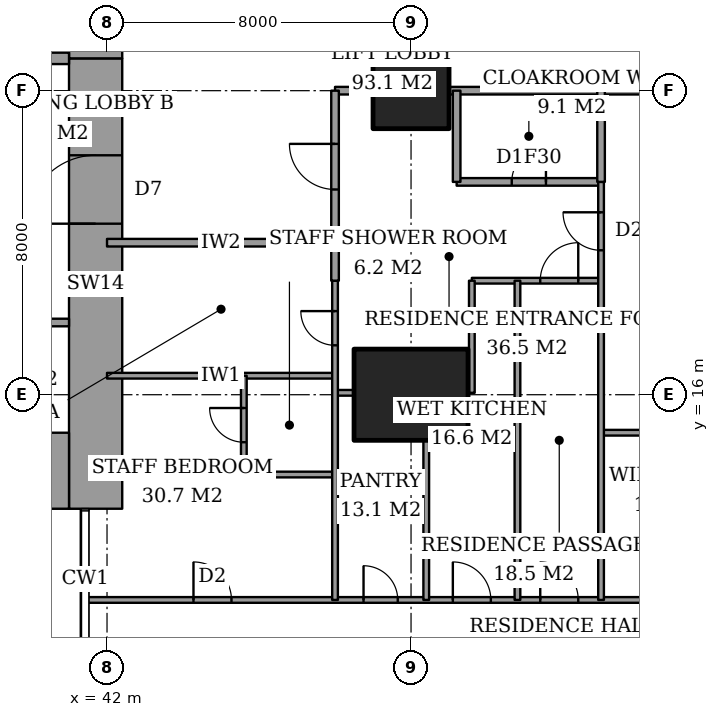
"""IFC4 building model, lengths in metres.
Left out: names, types, materials, properties, quantities, classifications, styles, units other than length and angle.
Written with IfcOpenShell. Run it as: python <this file> out.ifc"""

import sys

from ifc_helpers import new_model, si_unit, direction, frame, frame_2d, origin, origin_2d, place, context, subcontext, project, spatial, rectangle, extrude, element, fill, save


model = new_model("IFC4")
c1 = context("Model", 3, precision=1e-05, world=origin(), true_north=direction((0.0, 1.0)))
c2 = subcontext(c1, "Body", "Model", "MODEL_VIEW")
j1 = project(units=[si_unit("LENGTHUNIT", "METRE"), si_unit("PLANEANGLEUNIT", "RADIAN")], contexts=[c1])
p1 = place(None, origin())
s1 = spatial("IfcSite", under=j1, at=p1, CompositionType="ELEMENT")
p2 = place(p1, origin())
s2 = spatial("IfcBuilding", under=s1, at=p2, CompositionType="ELEMENT")
p3 = place(p2, frame((0.0, 0.0, 143.0)))
s3 = spatial("IfcBuildingStorey", under=s2, at=p3, CompositionType="ELEMENT", Elevation=143.0)
p4 = place(p3, frame((50.0, 16.0, 0.0), z_axis=(0.0, 0.0, 1.0), x_axis=(1.0, 0.0, 0.0)))
e1 = element("IfcColumn", 1, at=p4, inside=s3, PredefinedType="COLUMN", context=c2, shape_type="SweptSolid", body=[
    extrude(rectangle(XDim=3.0, YDim=2.4, at=origin_2d()), origin(), (0.0, 0.0, 1.0), 3.6),
])
p5 = place(p3, frame((50.0, 24.0, 0.0), z_axis=(0.0, 0.0, 1.0), x_axis=(1.0, 0.0, 0.0)))
e2 = element("IfcColumn", 2, at=p5, inside=s3, PredefinedType="COLUMN", context=c2, shape_type="SweptSolid", body=[
    extrude(rectangle(XDim=2.0, YDim=2.0, at=origin_2d()), origin(), (0.0, 0.0, 1.0), 3.6),
])
p6 = place(p3, frame((37.85, 14.0, 0.0), z_axis=(0.0, 0.0, 1.0), x_axis=(1.0, 0.0, 0.0)))
e3 = element("IfcWall", 3, at=p6, inside=s3, PredefinedType="SHEAR", context=c2, shape_type="SweptSolid", body=[
    extrude(rectangle(XDim=3.15, YDim=2.0, at=frame_2d((1.575, 0.0))), origin(), (0.0, 0.0, 1.0), 3.6),
])
p7 = place(p3, frame((41.7, 13.0, 0.0), z_axis=(0.0, 0.0, 1.0), x_axis=(0.0, 1.0, 0.0)))
e4 = element("IfcWall", 4, at=p7, inside=s3, PredefinedType="SHEAR", context=c2, shape_type="SweptSolid", body=[
    extrude(rectangle(XDim=11.85, YDim=1.4, at=frame_2d((5.925, 0.0))), origin(), (0.0, 0.0, 1.0), 3.6),
])
p8 = place(p7, frame((7.5, 0.0, 0.0)))
e5 = element("IfcOpeningElement", 5, at=p8, cuts=e4, PredefinedType="OPENING", context=c2, shape_type="SweptSolid", body=[
    extrude(rectangle(XDim=1.8, YDim=2.4, at=frame_2d((0.9, 1.2))), frame((0.0, 0.71, 0.0), z_axis=(0.0, -1.0, 0.0), x_axis=(1.0, 0.0, 0.0)), (0.0, 0.0, 1.0), 1.42),
])
p9 = place(p3, frame((41.7, 24.85, 0.0), z_axis=(0.0, 0.0, 1.0), x_axis=(0.0, 1.0, 0.0)))
e6 = element("IfcWall", 6, at=p9, inside=s3, PredefinedType="SHEAR", context=c2, shape_type="SweptSolid", body=[
    extrude(rectangle(XDim=10.15, YDim=1.4, at=frame_2d((5.075, 0.0))), origin(), (0.0, 0.0, 1.0), 3.6),
])
p10 = place(p3, frame((37.85, 24.85, 0.0), z_axis=(0.0, 0.0, 1.0), x_axis=(1.0, 0.0, 0.0)))
e7 = element("IfcWall", 7, at=p10, inside=s3, PredefinedType="SHEAR", context=c2, shape_type="SweptSolid", body=[
    extrude(rectangle(XDim=3.15, YDim=0.3, at=frame_2d((1.575, 0.0))), origin(), (0.0, 0.0, 1.0), 3.6),
])
p11 = place(p10, frame((0.95, 0.0, 0.0)))
e8 = element("IfcOpeningElement", 8, at=p11, cuts=e7, PredefinedType="OPENING", context=c2, shape_type="SweptSolid", body=[
    extrude(rectangle(XDim=1.0, YDim=2.1, at=frame_2d((0.5, 1.05))), frame((0.0, 0.16, 0.0), z_axis=(0.0, -1.0, 0.0), x_axis=(1.0, 0.0, 0.0)), (0.0, 0.0, 1.0), 0.32),
])
p12 = place(p3, frame((41.439, 10.6, 0.0), z_axis=(0.0, 0.0, 1.0), x_axis=(1.0, 0.0, 0.0)))
e9 = element("IfcWall", 9, at=p12, inside=s3, PredefinedType="PARTITIONING", context=c2, shape_type="SweptSolid", body=[
    extrude(rectangle(XDim=25.011, YDim=0.15, at=frame_2d((12.505, 0.0))), origin(), (0.0, 0.0, 1.0), 3.35),
])
p13 = place(p12, frame((11.961, 0.0, 0.0)))
e10 = element("IfcOpeningElement", 10, at=p13, cuts=e9, PredefinedType="OPENING", context=c2, shape_type="SweptSolid", body=[
    extrude(rectangle(XDim=1.0, YDim=2.1, at=frame_2d((0.5, 1.05))), frame((0.0, 0.085, 0.0), z_axis=(0.0, -1.0, 0.0), x_axis=(1.0, 0.0, 0.0)), (0.0, 0.0, 1.0), 0.17),
])
p14 = place(p12, frame((20.924, 0.0, 0.0)))
e11 = element("IfcOpeningElement", 11, at=p14, cuts=e9, PredefinedType="OPENING", context=c2, shape_type="SweptSolid", body=[
    extrude(rectangle(XDim=1.0, YDim=2.1, at=frame_2d((0.5, 1.05))), frame((0.0, 0.085, 0.0), z_axis=(0.0, -1.0, 0.0), x_axis=(1.0, 0.0, 0.0)), (0.0, 0.0, 1.0), 0.17),
])
p15 = place(p12, frame((15.249, 0.0, 0.0)))
e12 = element("IfcOpeningElement", 12, at=p15, cuts=e9, PredefinedType="OPENING", context=c2, shape_type="SweptSolid", body=[
    extrude(rectangle(XDim=0.9, YDim=2.1, at=frame_2d((0.45, 1.05))), frame((0.0, 0.085, 0.0), z_axis=(0.0, -1.0, 0.0), x_axis=(1.0, 0.0, 0.0)), (0.0, 0.0, 1.0), 0.17),
])
p16 = place(p12, frame((9.661, 0.0, 0.0)))
e13 = element("IfcOpeningElement", 13, at=p16, cuts=e9, PredefinedType="OPENING", context=c2, shape_type="SweptSolid", body=[
    extrude(rectangle(XDim=1.0, YDim=2.1, at=frame_2d((0.5, 1.05))), frame((0.0, 0.085, 0.0), z_axis=(0.0, -1.0, 0.0), x_axis=(1.0, 0.0, 0.0)), (0.0, 0.0, 1.0), 0.17),
])
p17 = place(p12, frame((7.311, 0.0, 0.0)))
e14 = element("IfcOpeningElement", 14, at=p17, cuts=e9, PredefinedType="OPENING", context=c2, shape_type="SweptSolid", body=[
    extrude(rectangle(XDim=0.9, YDim=2.1, at=frame_2d((0.45, 1.05))), frame((0.0, 0.085, 0.0), z_axis=(0.0, -1.0, 0.0), x_axis=(1.0, 0.0, 0.0)), (0.0, 0.0, 1.0), 0.17),
])
p18 = place(p12, frame((2.836, 0.0, 0.0)))
e15 = element("IfcOpeningElement", 15, at=p18, cuts=e9, PredefinedType="OPENING", context=c2, shape_type="SweptSolid", body=[
    extrude(rectangle(XDim=1.0, YDim=2.1, at=frame_2d((0.5, 1.05))), frame((0.0, 0.085, 0.0), z_axis=(0.0, -1.0, 0.0), x_axis=(1.0, 0.0, 0.0)), (0.0, 0.0, 1.0), 0.17),
])
p19 = place(p3, frame((45.6, 13.9, 0.0), z_axis=(0.0, 0.0, 1.0), x_axis=(1.0, 0.0, 0.0)))
e16 = element("IfcWall", 16, at=p19, inside=s3, PredefinedType="PARTITIONING", context=c2, shape_type="SweptSolid", body=[
    extrude(rectangle(XDim=2.4, YDim=0.15, at=frame_2d((1.2, 0.0))), origin(), (0.0, 0.0, 1.0), 3.35),
])
p20 = place(p3, frame((55.0, 15.0, 0.0), z_axis=(0.0, 0.0, 1.0), x_axis=(1.0, 0.0, 0.0)))
e17 = element("IfcWall", 17, at=p20, inside=s3, PredefinedType="PARTITIONING", context=c2, shape_type="SweptSolid", body=[
    extrude(rectangle(XDim=1.5, YDim=0.15, at=frame_2d((0.75, 0.0))), origin(), (0.0, 0.0, 1.0), 3.35),
])
p21 = place(p3, frame((48.0, 16.05, 0.0), z_axis=(0.0, 0.0, 1.0), x_axis=(1.0, 0.0, 0.0)))
e18 = element("IfcWall", 18, at=p21, inside=s3, PredefinedType="PARTITIONING", context=c2, shape_type="SweptSolid", body=[
    extrude(rectangle(XDim=0.5, YDim=0.15, at=frame_2d((0.25, 0.0))), origin(), (0.0, 0.0, 1.0), 2.634),
])
p22 = place(p3, frame((42.0, 16.5, 0.0), z_axis=(0.0, 0.0, 1.0), x_axis=(1.0, 0.0, 0.0)))
e19 = element("IfcWall", 19, at=p22, inside=s3, PredefinedType="PARTITIONING", context=c2, shape_type="SweptSolid", body=[
    extrude(rectangle(XDim=6.0, YDim=0.15, at=frame_2d((3.0, 0.0))), origin(), (0.0, 0.0, 1.0), 3.35),
])
p23 = place(p3, frame((51.6, 19.0, 0.0), z_axis=(0.0, 0.0, 1.0), x_axis=(1.0, 0.0, 0.0)))
e20 = element("IfcWall", 20, at=p23, inside=s3, PredefinedType="PARTITIONING", context=c2, shape_type="SweptSolid", body=[
    extrude(rectangle(XDim=3.4, YDim=0.15, at=frame_2d((1.7, 0.0))), origin(), (0.0, 0.0, 1.0), 3.35),
])
p24 = place(p23, frame((1.8, 0.0, 0.0)))
e21 = element("IfcOpeningElement", 21, at=p24, cuts=e20, PredefinedType="OPENING", context=c2, shape_type="SweptSolid", body=[
    extrude(rectangle(XDim=1.0, YDim=2.1, at=frame_2d((0.5, 1.05))), frame((0.0, 0.085, 0.0), z_axis=(0.0, -1.0, 0.0), x_axis=(1.0, 0.0, 0.0)), (0.0, 0.0, 1.0), 0.17),
])
p25 = place(p3, frame((42.0, 20.0, 0.0), z_axis=(0.0, 0.0, 1.0), x_axis=(1.0, 0.0, 0.0)))
e22 = element("IfcWall", 22, at=p25, inside=s3, PredefinedType="PARTITIONING", context=c2, shape_type="SweptSolid", body=[
    extrude(rectangle(XDim=6.0, YDim=0.2, at=frame_2d((3.0, 0.0))), origin(), (0.0, 0.0, 1.0), 3.35),
])
p26 = place(p3, frame((51.2, 21.6, 0.0), z_axis=(0.0, 0.0, 1.0), x_axis=(1.0, 0.0, 0.0)))
e23 = element("IfcWall", 23, at=p26, inside=s3, PredefinedType="PARTITIONING", context=c2, shape_type="SweptSolid", body=[
    extrude(rectangle(XDim=3.8, YDim=0.2, at=frame_2d((1.9, 0.0))), origin(), (0.0, 0.0, 1.0), 3.35),
])
p27 = place(p26, frame((1.45, 0.0, 0.0)))
e24 = element("IfcOpeningElement", 24, at=p27, cuts=e23, PredefinedType="OPENING", context=c2, shape_type="SweptSolid", body=[
    extrude(rectangle(XDim=0.9, YDim=2.1, at=frame_2d((0.45, 1.05))), frame((0.0, 0.11, 0.0), z_axis=(0.0, -1.0, 0.0), x_axis=(1.0, 0.0, 0.0)), (0.0, 0.0, 1.0), 0.22),
])
p28 = place(p3, frame((48.0, 24.0, 0.0), z_axis=(0.0, 0.0, 1.0), x_axis=(1.0, 0.0, 0.0)))
e25 = element("IfcWall", 25, at=p28, inside=s3, PredefinedType="PARTITIONING", context=c2, shape_type="SweptSolid", body=[
    extrude(rectangle(XDim=1.0, YDim=0.2, at=frame_2d((0.5, 0.0))), origin(), (0.0, 0.0, 1.0), 3.35),
])
p29 = place(p3, frame((51.0, 24.0, 0.0), z_axis=(0.0, 0.0, 1.0), x_axis=(1.0, 0.0, 0.0)))
e26 = element("IfcWall", 26, at=p29, inside=s3, PredefinedType="PARTITIONING", context=c2, shape_type="SweptSolid", body=[
    extrude(rectangle(XDim=6.0, YDim=0.2, at=frame_2d((3.0, 0.0))), origin(), (0.0, 0.0, 1.0), 3.35),
])
p30 = place(p3, frame((45.6, 13.9, 0.0), z_axis=(0.0, 0.0, 1.0), x_axis=(0.0, 1.0, 0.0)))
e27 = element("IfcWall", 27, at=p30, inside=s3, PredefinedType="PARTITIONING", context=c2, shape_type="SweptSolid", body=[
    extrude(rectangle(XDim=2.6, YDim=0.15, at=frame_2d((1.3, 0.0))), origin(), (0.0, 0.0, 1.0), 3.35),
])
p31 = place(p30, frame((0.85, 0.0, 0.0)))
e28 = element("IfcOpeningElement", 28, at=p31, cuts=e27, PredefinedType="OPENING", context=c2, shape_type="SweptSolid", body=[
    extrude(rectangle(XDim=0.9, YDim=2.1, at=frame_2d((0.45, 1.05))), frame((0.0, 0.085, 0.0), z_axis=(0.0, -1.0, 0.0), x_axis=(1.0, 0.0, 0.0)), (0.0, 0.0, 1.0), 0.17),
])
p32 = place(p3, frame((48.0, 19.0, 0.0), z_axis=(0.0, 0.0, 1.0), x_axis=(0.0, 1.0, 0.0)))
e29 = element("IfcWall", 29, at=p32, inside=s3, PredefinedType="PARTITIONING", context=c2, shape_type="SweptSolid", body=[
    extrude(rectangle(XDim=5.0, YDim=0.2, at=frame_2d((2.5, 0.0))), origin(), (0.0, 0.0, 1.0), 3.35),
])
p33 = place(p32, frame((2.4, 0.0, 0.0)))
e30 = element("IfcOpeningElement", 30, at=p33, cuts=e29, PredefinedType="OPENING", context=c2, shape_type="SweptSolid", body=[
    extrude(rectangle(XDim=1.2, YDim=2.4, at=frame_2d((0.6, 1.2))), frame((0.0, 0.11, 0.0), z_axis=(0.0, -1.0, 0.0), x_axis=(1.0, 0.0, 0.0)), (0.0, 0.0, 1.0), 0.22),
])
p34 = place(p3, frame((48.0, 10.6, 0.0), z_axis=(0.0, 0.0, 1.0), x_axis=(0.0, 1.0, 0.0)))
e31 = element("IfcWall", 31, at=p34, inside=s3, PredefinedType="PARTITIONING", context=c2, shape_type="SweptSolid", body=[
    extrude(rectangle(XDim=8.4, YDim=0.15, at=frame_2d((4.2, 0.0))), origin(), (0.0, 0.0, 1.0), 3.35),
])
p35 = place(p34, frame((6.7, 0.0, 0.0)))
e32 = element("IfcOpeningElement", 32, at=p35, cuts=e31, PredefinedType="OPENING", context=c2, shape_type="SweptSolid", body=[
    extrude(rectangle(XDim=0.9, YDim=2.1, at=frame_2d((0.45, 1.05))), frame((0.0, 0.085, 0.0), z_axis=(0.0, -1.0, 0.0), x_axis=(1.0, 0.0, 0.0)), (0.0, 0.0, 1.0), 0.17),
])
p36 = place(p3, frame((50.4, 10.6, 0.0), z_axis=(0.0, 0.0, 1.0), x_axis=(0.0, 1.0, 0.0)))
e33 = element("IfcWall", 33, at=p36, inside=s3, PredefinedType="PARTITIONING", context=c2, shape_type="SweptSolid", body=[
    extrude(rectangle(XDim=4.2, YDim=0.15, at=frame_2d((2.1, 0.0))), origin(), (0.0, 0.0, 1.0), 3.35),
])
p37 = place(p3, frame((51.2, 21.6, 0.0), z_axis=(0.0, 0.0, 1.0), x_axis=(0.0, 1.0, 0.0)))
e34 = element("IfcWall", 34, at=p37, inside=s3, PredefinedType="PARTITIONING", context=c2, shape_type="SweptSolid", body=[
    extrude(rectangle(XDim=2.4, YDim=0.2, at=frame_2d((1.2, 0.0))), origin(), (0.0, 0.0, 1.0), 3.35),
])
p38 = place(p3, frame((51.6, 16.05, 0.0), z_axis=(0.0, 0.0, 1.0), x_axis=(0.0, 1.0, 0.0)))
e35 = element("IfcWall", 35, at=p38, inside=s3, PredefinedType="PARTITIONING", context=c2, shape_type="SweptSolid", body=[
    extrude(rectangle(XDim=2.95, YDim=0.15, at=frame_2d((1.475, 0.0))), origin(), (0.0, 0.0, 1.0), 3.35),
])
p39 = place(p3, frame((52.8, 10.6, 0.0), z_axis=(0.0, 0.0, 1.0), x_axis=(0.0, 1.0, 0.0)))
e36 = element("IfcWall", 36, at=p39, inside=s3, PredefinedType="PARTITIONING", context=c2, shape_type="SweptSolid", body=[
    extrude(rectangle(XDim=8.4, YDim=0.15, at=frame_2d((4.2, 0.0))), origin(), (0.0, 0.0, 1.0), 3.35),
])
p40 = place(p3, frame((55.0, 21.6, 0.0), z_axis=(0.0, 0.0, 1.0), x_axis=(0.0, 1.0, 0.0)))
e37 = element("IfcWall", 37, at=p40, inside=s3, PredefinedType="PARTITIONING", context=c2, shape_type="SweptSolid", body=[
    extrude(rectangle(XDim=2.4, YDim=0.2, at=frame_2d((1.2, 0.0))), origin(), (0.0, 0.0, 1.0), 3.35),
])
p41 = place(p3, frame((55.0, 10.6, 0.0), z_axis=(0.0, 0.0, 1.0), x_axis=(0.0, 1.0, 0.0)))
e38 = element("IfcWall", 38, at=p41, inside=s3, PredefinedType="PARTITIONING", context=c2, shape_type="SweptSolid", body=[
    extrude(rectangle(XDim=11.0, YDim=0.15, at=frame_2d((5.5, 0.0))), origin(), (0.0, 0.0, 1.0), 3.35),
])
p42 = place(p41, frame((9.2, 0.0, 0.0)))
e39 = element("IfcOpeningElement", 39, at=p42, cuts=e38, PredefinedType="OPENING", context=c2, shape_type="SweptSolid", body=[
    extrude(rectangle(XDim=1.0, YDim=2.1, at=frame_2d((0.5, 1.05))), frame((0.0, 0.085, 0.0), z_axis=(0.0, -1.0, 0.0), x_axis=(1.0, 0.0, 0.0)), (0.0, 0.0, 1.0), 0.17),
])
p43 = place(p3, frame((28.3, 17.9, 0.0), z_axis=(0.0, 0.0, 1.0), x_axis=(1.0, 0.0, 0.0)))
e40 = element("IfcWall", 40, at=p43, inside=s3, PredefinedType="PARTITIONING", context=c2, shape_type="SweptSolid", body=[
    extrude(rectangle(XDim=12.7, YDim=0.2, at=frame_2d((6.35, 0.0))), origin(), (0.0, 0.0, 1.0), 3.6),
])
p44 = place(p43, frame((0.95, 0.0, 0.0)))
e41 = element("IfcOpeningElement", 41, at=p44, cuts=e40, PredefinedType="OPENING", context=c2, shape_type="SweptSolid", body=[
    extrude(rectangle(XDim=1.1, YDim=2.1, at=frame_2d((0.55, 1.05))), frame((0.0, 0.11, 0.0), z_axis=(0.0, -1.0, 0.0), x_axis=(1.0, 0.0, 0.0)), (0.0, 0.0, 1.0), 0.22),
])
p45 = place(p43, frame((4.15, 0.0, 0.0)))
e42 = element("IfcOpeningElement", 42, at=p45, cuts=e40, PredefinedType="OPENING", context=c2, shape_type="SweptSolid", body=[
    extrude(rectangle(XDim=1.1, YDim=2.1, at=frame_2d((0.55, 1.05))), frame((0.0, 0.11, 0.0), z_axis=(0.0, -1.0, 0.0), x_axis=(1.0, 0.0, 0.0)), (0.0, 0.0, 1.0), 0.22),
])
p46 = place(p43, frame((7.35, 0.0, 0.0)))
e43 = element("IfcOpeningElement", 43, at=p46, cuts=e40, PredefinedType="OPENING", context=c2, shape_type="SweptSolid", body=[
    extrude(rectangle(XDim=1.1, YDim=2.1, at=frame_2d((0.55, 1.05))), frame((0.0, 0.11, 0.0), z_axis=(0.0, -1.0, 0.0), x_axis=(1.0, 0.0, 0.0)), (0.0, 0.0, 1.0), 0.22),
])
p47 = place(p43, frame((10.6, 0.0, 0.0)))
e44 = element("IfcOpeningElement", 44, at=p47, cuts=e40, PredefinedType="OPENING", context=c2, shape_type="SweptSolid", body=[
    extrude(rectangle(XDim=1.2, YDim=2.1, at=frame_2d((0.6, 1.05))), frame((0.0, 0.11, 0.0), z_axis=(0.0, -1.0, 0.0), x_axis=(1.0, 0.0, 0.0)), (0.0, 0.0, 1.0), 0.22),
])
p48 = place(p13, origin())
e45 = element("IfcDoor", 45, at=p48, inside=s3, OperationType="SINGLE_SWING_RIGHT", PredefinedType="DOOR", context=c2, shape_type="SweptSolid", body=[
    extrude(rectangle(XDim=1.0, YDim=2.1, at=frame_2d((0.5, 1.05))), frame((0.0, 0.025, 0.0), z_axis=(0.0, -1.0, 0.0), x_axis=(1.0, 0.0, 0.0)), (0.0, 0.0, 1.0), 0.05),
])
fill(e10, e45)
p49 = place(p42, origin())
e46 = element("IfcDoor", 46, at=p49, inside=s3, OperationType="SINGLE_SWING_LEFT", PredefinedType="DOOR", context=c2, shape_type="SweptSolid", body=[
    extrude(rectangle(XDim=1.0, YDim=2.1, at=frame_2d((0.5, 1.05))), frame((0.0, 0.025, 0.0), z_axis=(0.0, -1.0, 0.0), x_axis=(1.0, 0.0, 0.0)), (0.0, 0.0, 1.0), 0.05),
])
fill(e39, e46)
p50 = place(p27, origin())
e47 = element("IfcDoor", 47, at=p50, inside=s3, OperationType="SINGLE_SWING_LEFT", PredefinedType="DOOR", context=c2, shape_type="SweptSolid", body=[
    extrude(rectangle(XDim=0.9, YDim=2.1, at=frame_2d((0.45, 1.05))), frame((0.0, 0.025, 0.0), z_axis=(0.0, -1.0, 0.0), x_axis=(1.0, 0.0, 0.0)), (0.0, 0.0, 1.0), 0.05),
])
fill(e24, e47)
p51 = place(p33, origin())
e48 = element("IfcDoor", 48, at=p51, inside=s3, OperationType="SINGLE_SWING_LEFT", PredefinedType="DOOR", context=c2, shape_type="SweptSolid", body=[
    extrude(rectangle(XDim=1.2, YDim=2.4, at=frame_2d((0.6, 1.2))), frame((0.0, 0.025, 0.0), z_axis=(0.0, -1.0, 0.0), x_axis=(1.0, 0.0, 0.0)), (0.0, 0.0, 1.0), 0.05),
])
fill(e30, e48)
p52 = place(p24, origin())
e49 = element("IfcDoor", 49, at=p52, inside=s3, OperationType="SINGLE_SWING_LEFT", PredefinedType="DOOR", context=c2, shape_type="SweptSolid", body=[
    extrude(rectangle(XDim=1.0, YDim=2.1, at=frame_2d((0.5, 1.05))), frame((0.0, 0.025, 0.0), z_axis=(0.0, -1.0, 0.0), x_axis=(1.0, 0.0, 0.0)), (0.0, 0.0, 1.0), 0.05),
])
fill(e21, e49)
p53 = place(p16, origin())
e50 = element("IfcDoor", 50, at=p53, inside=s3, OperationType="SINGLE_SWING_RIGHT", PredefinedType="DOOR", context=c2, shape_type="SweptSolid", body=[
    extrude(rectangle(XDim=1.0, YDim=2.1, at=frame_2d((0.5, 1.05))), frame((0.0, 0.025, 0.0), z_axis=(0.0, -1.0, 0.0), x_axis=(1.0, 0.0, 0.0)), (0.0, 0.0, 1.0), 0.05),
])
fill(e13, e50)
p54 = place(p17, origin())
e51 = element("IfcDoor", 51, at=p54, inside=s3, OperationType="SINGLE_SWING_RIGHT", PredefinedType="DOOR", context=c2, shape_type="SweptSolid", body=[
    extrude(rectangle(XDim=0.9, YDim=2.1, at=frame_2d((0.45, 1.05))), frame((0.0, 0.025, 0.0), z_axis=(0.0, -1.0, 0.0), x_axis=(1.0, 0.0, 0.0)), (0.0, 0.0, 1.0), 0.05),
])
fill(e14, e51)
p55 = place(p31, origin())
e52 = element("IfcDoor", 52, at=p55, inside=s3, OperationType="SINGLE_SWING_LEFT", PredefinedType="DOOR", context=c2, shape_type="SweptSolid", body=[
    extrude(rectangle(XDim=0.9, YDim=2.1, at=frame_2d((0.45, 1.05))), frame((0.0, 0.025, 0.0), z_axis=(0.0, -1.0, 0.0), x_axis=(1.0, 0.0, 0.0)), (0.0, 0.0, 1.0), 0.05),
])
fill(e28, e52)
p56 = place(p18, origin())
e53 = element("IfcDoor", 53, at=p56, inside=s3, OperationType="SINGLE_SWING_RIGHT", PredefinedType="DOOR", context=c2, shape_type="SweptSolid", body=[
    extrude(rectangle(XDim=1.0, YDim=2.1, at=frame_2d((0.5, 1.05))), frame((0.0, 0.025, 0.0), z_axis=(0.0, -1.0, 0.0), x_axis=(1.0, 0.0, 0.0)), (0.0, 0.0, 1.0), 0.05),
])
fill(e15, e53)
p57 = place(p35, origin())
e54 = element("IfcDoor", 54, at=p57, inside=s3, OperationType="SINGLE_SWING_LEFT", PredefinedType="DOOR", context=c2, shape_type="SweptSolid", body=[
    extrude(rectangle(XDim=0.9, YDim=2.1, at=frame_2d((0.45, 1.05))), frame((0.0, 0.025, 0.0), z_axis=(0.0, -1.0, 0.0), x_axis=(1.0, 0.0, 0.0)), (0.0, 0.0, 1.0), 0.05),
])
fill(e32, e54)
p58 = place(p8, origin())
e55 = element("IfcDoor", 55, at=p58, inside=s3, OperationType="DOUBLE_DOOR_DOUBLE_SWING", PredefinedType="DOOR", context=c2, shape_type="SweptSolid", body=[
    extrude(rectangle(XDim=1.8, YDim=2.4, at=frame_2d((0.9, 1.2))), frame((0.0, 0.025, 0.0), z_axis=(0.0, -1.0, 0.0), x_axis=(1.0, 0.0, 0.0)), (0.0, 0.0, 1.0), 0.05),
])
fill(e5, e55)
save(model, sys.argv[1])
